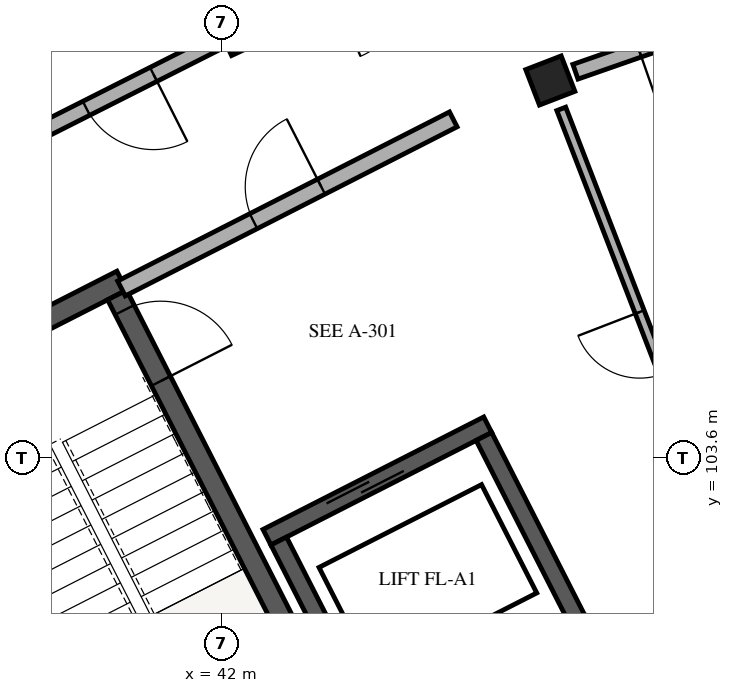
"""IFC4 building model, lengths in metres.
Left out: names, types, materials, properties, quantities, classifications, styles, units other than length and angle.
Written with IfcOpenShell. Run it as: python <this file> out.ifc"""

import sys

from ifc_helpers import new_model, si_unit, direction, frame, frame_2d, origin, origin_2d, place, context, subcontext, project, spatial, rectangle, extrude, element, fill, save


model = new_model("IFC4")
c1 = context("Model", 3, precision=1e-05, world=origin(), true_north=direction((0.0, 1.0)))
c2 = subcontext(c1, "Body", "Model", "MODEL_VIEW")
j1 = project(units=[si_unit("LENGTHUNIT", "METRE"), si_unit("PLANEANGLEUNIT", "RADIAN")], contexts=[c1])
p1 = place(None, origin())
s1 = spatial("IfcSite", under=j1, at=p1, CompositionType="ELEMENT")
p2 = place(p1, origin())
s2 = spatial("IfcBuilding", under=s1, at=p2, CompositionType="ELEMENT")
p3 = place(p2, frame((0.0, 0.0, 25.64)))
s3 = spatial("IfcBuildingStorey", under=s2, at=p3, CompositionType="ELEMENT", Elevation=25.64)
p4 = place(p3, frame((37.773, 104.296, 0.0), z_axis=(0.0, 0.0, 1.0), x_axis=(0.453992276384, -0.891005618941, 0.0)))
e1 = element("IfcWall", 1, at=p4, inside=s3, PredefinedType="SHEAR", context=c2, shape_type="SweptSolid", body=[
    extrude(rectangle(XDim=6.6, YDim=0.28, at=frame_2d((3.3, 0.0))), origin(), (0.0, 0.0, 1.0), 3.11),
])
p5 = place(p3, frame((37.585, 104.357, 0.0), z_axis=(0.0, 0.0, 1.0), x_axis=(0.891020222667, 0.453963613958, 0.0)))
e2 = element("IfcWall", 2, at=p5, inside=s3, PredefinedType="SHEAR", context=c2, shape_type="SweptSolid", body=[
    extrude(rectangle(XDim=3.48, YDim=0.28, at=frame_2d((1.74, 0.0))), origin(), (0.0, 0.0, 1.0), 3.11),
])
p6 = place(p3, frame((40.625, 105.748, 0.0), z_axis=(0.0, 0.0, 1.0), x_axis=(0.453992276384, -0.891005618941, 0.0)))
e3 = element("IfcWall", 3, at=p6, inside=s3, PredefinedType="SHEAR", context=c2, shape_type="SweptSolid", body=[
    extrude(rectangle(XDim=6.6, YDim=0.28, at=frame_2d((3.3, 0.0))), origin(), (0.0, 0.0, 1.0), 3.11),
])
p7 = place(p6, frame((0.22, 0.0, 0.0)))
e4 = element("IfcOpeningElement", 4, at=p7, cuts=e3, PredefinedType="OPENING", context=c2, shape_type="SweptSolid", body=[
    extrude(rectangle(XDim=1.05, YDim=2.15, at=frame_2d((0.525, 1.075))), frame((0.0, 0.15, 0.0), z_axis=(0.0, -1.0, 0.0), x_axis=(1.0, 0.0, 0.0)), (0.0, 0.0, 1.0), 0.3),
])
p8 = place(p3, frame((42.597, 102.561, 0.0), z_axis=(0.0, 0.0, 1.0), x_axis=(0.891001200497, 0.454000947921, 0.0)))
e5 = element("IfcWall", 5, at=p8, inside=s3, PredefinedType="SHEAR", context=c2, shape_type="SweptSolid", body=[
    extrude(rectangle(XDim=3.26, YDim=0.23, at=frame_2d((1.63, 0.0))), origin(), (0.0, 0.0, 1.0), 3.11),
])
p9 = place(p8, frame((0.9, 0.0, 0.0)))
e6 = element("IfcOpeningElement", 6, at=p9, cuts=e5, PredefinedType="OPENING", context=c2, shape_type="SweptSolid", body=[
    extrude(rectangle(XDim=1.1, YDim=2.15, at=frame_2d((0.55, 1.075))), frame((0.0, 0.125, 0.0), z_axis=(0.0, -1.0, 0.0), x_axis=(1.0, 0.0, 0.0)), (0.0, 0.0, 1.0), 0.25),
])
for number, where, z_axis, x_axis in (
    (7, (42.751, 102.511, 0.0), (0.0, 0.0, 1.0), (0.454, -0.891, 0.0)),
    (8, (45.451, 103.886, 0.0), (0.0, 0.0, 1.0), (0.454, -0.891, 0.0)),
):
    element("IfcWall", number, at=place(p3, frame(where, z_axis=z_axis, x_axis=x_axis)), inside=s3, PredefinedType="SHEAR", context=c2, shape_type="SweptSolid", body=[
        extrude(rectangle(XDim=2.7, YDim=0.23, at=frame_2d((1.35, 0.0))), origin(), (0.0, 0.0, 1.0), 3.11),
    ])
for number, where, z_axis, x_axis in (
    (9, (46.325, 108.57, 0.0), (0.0, 0.0, 1.0), (-0.36, 0.933, 0.0)),
    (10, (42.252, 109.23, 0.0), (0.0, 0.0, 1.0), (-0.421, 0.907, 0.0)),
):
    element("IfcColumn", number, at=place(p3, frame(where, z_axis=z_axis, x_axis=x_axis)), inside=s3, PredefinedType="COLUMN", context=c2, shape_type="SweptSolid", body=[
        extrude(rectangle(XDim=0.5, YDim=0.5, at=origin_2d()), origin(), (0.0, 0.0, 1.0), 3.11),
    ])
p10 = place(p3, frame((40.682, 105.834, 0.0), z_axis=(0.0, 0.0, 1.0), x_axis=(0.891003372311, 0.453996685595, 0.0)))
e11 = element("IfcWall", 11, at=p10, inside=s3, PredefinedType="PARTITIONING", context=c2, shape_type="SweptSolid", body=[
    extrude(rectangle(XDim=4.9, YDim=0.22, at=frame_2d((2.45, 0.0))), origin(), (0.0, 0.0, 1.0), 2.34),
])
p11 = place(p10, frame((1.95, 0.0, 0.0)))
e12 = element("IfcOpeningElement", 12, at=p11, cuts=e11, PredefinedType="OPENING", context=c2, shape_type="SweptSolid", body=[
    extrude(rectangle(XDim=1.0, YDim=2.15, at=frame_2d((0.5, 1.075))), frame((0.0, 0.12, 0.0), z_axis=(0.0, -1.0, 0.0), x_axis=(1.0, 0.0, 0.0)), (0.0, 0.0, 1.0), 0.24),
])
p12 = place(p3, frame((49.222, 109.58, 0.0), z_axis=(0.0, 0.0, 1.0), x_axis=(-0.944265123647, -0.329185929627, 0.0)))
e13 = element("IfcWall", 13, at=p12, inside=s3, PredefinedType="PARTITIONING", context=c2, shape_type="SweptSolid", body=[
    extrude(rectangle(XDim=2.718, YDim=0.205, at=frame_2d((1.359, 0.0))), origin(), (0.0, 0.0, 1.0), 2.37),
])
p13 = place(p12, frame((0.884, 0.0, 0.0)))
e14 = element("IfcOpeningElement", 14, at=p13, cuts=e13, PredefinedType="OPENING", context=c2, shape_type="SweptSolid", body=[
    extrude(rectangle(XDim=0.95, YDim=2.13, at=frame_2d((0.475, 1.065))), frame((0.0, 0.113, 0.0), z_axis=(0.0, -1.0, 0.0), x_axis=(1.0, 0.0, 0.0)), (0.0, 0.0, 1.0), 0.225),
])
p14 = place(p3, frame((48.846, 102.04, 0.0), z_axis=(0.0, 0.0, 1.0), x_axis=(-0.360183473608, 0.932881485152, 0.0)))
e15 = element("IfcWall", 15, at=p14, inside=s3, PredefinedType="PARTITIONING", context=c2, shape_type="SweptSolid", body=[
    extrude(rectangle(XDim=6.6, YDim=0.125, at=frame_2d((3.3, 0.0))), origin(), (0.0, 0.0, 1.0), 2.37),
])
p15 = place(p14, frame((2.865, 0.0, 0.0)))
e16 = element("IfcOpeningElement", 16, at=p15, cuts=e15, PredefinedType="OPENING", context=c2, shape_type="SweptSolid", body=[
    extrude(rectangle(XDim=0.87, YDim=2.08, at=frame_2d((0.435, 1.04))), frame((0.0, 0.073, 0.0), z_axis=(0.0, -1.0, 0.0), x_axis=(1.0, 0.0, 0.0)), (0.0, 0.0, 1.0), 0.145),
])
p16 = place(p3, frame((41.94, 109.073, 0.0), z_axis=(0.0, 0.0, 1.0), x_axis=(-0.89273239336, -0.450587254419, 0.0)))
e17 = element("IfcWall", 17, at=p16, inside=s3, PredefinedType="PARTITIONING", context=c2, shape_type="SweptSolid", body=[
    extrude(rectangle(XDim=2.863, YDim=0.205, at=frame_2d((1.432, 0.0))), origin(), (0.0, 0.0, 1.0), 2.37),
])
p17 = place(p16, frame((0.937, 0.0, 0.0)))
e18 = element("IfcOpeningElement", 18, at=p17, cuts=e17, PredefinedType="OPENING", context=c2, shape_type="SweptSolid", body=[
    extrude(rectangle(XDim=0.99, YDim=2.16, at=frame_2d((0.495, 1.08))), frame((0.0, 0.113, 0.0), z_axis=(0.0, -1.0, 0.0), x_axis=(1.0, 0.0, 0.0)), (0.0, 0.0, 1.0), 0.225),
])
p18 = place(p7, origin())
e19 = element("IfcDoor", 19, at=p18, inside=s3, OperationType="SINGLE_SWING_RIGHT", PredefinedType="DOOR", context=c2, shape_type="SweptSolid", body=[
    extrude(rectangle(XDim=1.05, YDim=2.15, at=frame_2d((0.525, 1.075))), frame((0.0, 0.025, 0.0), z_axis=(0.0, -1.0, 0.0), x_axis=(1.0, 0.0, 0.0)), (0.0, 0.0, 1.0), 0.05),
])
fill(e4, e19)
p19 = place(p9, origin())
e20 = element("IfcDoor", 20, at=p19, inside=s3, OperationType="DOUBLE_DOOR_SLIDING", PredefinedType="DOOR", context=c2, shape_type="SweptSolid", body=[
    extrude(rectangle(XDim=1.1, YDim=2.15, at=frame_2d((0.55, 1.075))), frame((0.0, 0.025, 0.0), z_axis=(0.0, -1.0, 0.0), x_axis=(1.0, 0.0, 0.0)), (0.0, 0.0, 1.0), 0.05),
])
fill(e6, e20)
p20 = place(p11, origin())
e21 = element("IfcDoor", 21, at=p20, inside=s3, OperationType="SINGLE_SWING_RIGHT", PredefinedType="DOOR", context=c2, shape_type="SweptSolid", body=[
    extrude(rectangle(XDim=1.0, YDim=2.15, at=frame_2d((0.5, 1.075))), frame((0.0, 0.025, 0.0), z_axis=(0.0, -1.0, 0.0), x_axis=(1.0, 0.0, 0.0)), (0.0, 0.0, 1.0), 0.05),
])
fill(e12, e21)
p21 = place(p15, origin())
e22 = element("IfcDoor", 22, at=p21, inside=s3, OperationType="SINGLE_SWING_RIGHT", PredefinedType="DOOR", context=c2, shape_type="SweptSolid", body=[
    extrude(rectangle(XDim=0.87, YDim=2.08, at=frame_2d((0.435, 1.04))), frame((0.0, 0.025, 0.0), z_axis=(0.0, -1.0, 0.0), x_axis=(1.0, 0.0, 0.0)), (0.0, 0.0, 1.0), 0.05),
])
fill(e16, e22)
p22 = place(p17, origin())
e23 = element("IfcDoor", 23, at=p22, inside=s3, OperationType="SINGLE_SWING_LEFT", PredefinedType="DOOR", context=c2, shape_type="SweptSolid", body=[
    extrude(rectangle(XDim=0.99, YDim=2.16, at=frame_2d((0.495, 1.08))), frame((0.0, 0.025, 0.0), z_axis=(0.0, -1.0, 0.0), x_axis=(1.0, 0.0, 0.0)), (0.0, 0.0, 1.0), 0.05),
])
fill(e18, e23)
save(model, sys.argv[1])
